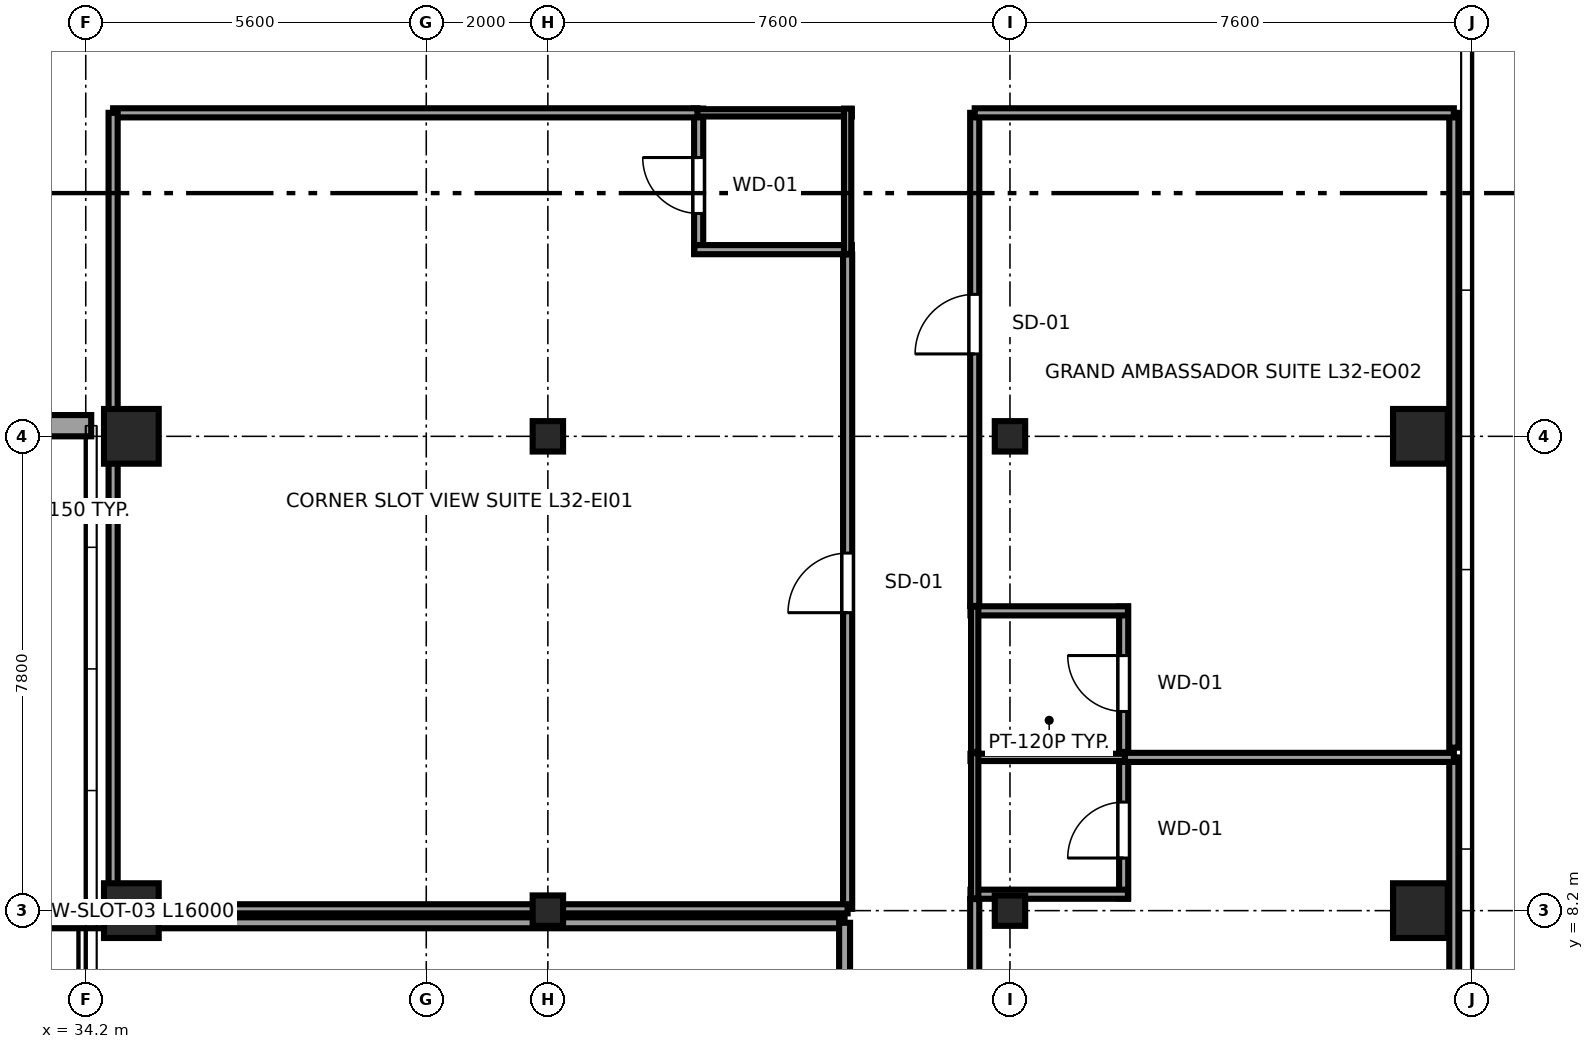
"""IFC4 building model, lengths in metres.
Left out: names, types, materials, properties, quantities, classifications, styles, units other than length and angle.
Written with IfcOpenShell. Run it as: python <this file> out.ifc"""

import sys

from ifc_helpers import new_model, si_unit, direction, frame, frame_2d, origin, origin_2d, place, context, subcontext, project, spatial, rectangle, i_section, extrude, source, transform, mapped, element, fill, save


model = new_model("IFC4")
c1 = context("Model", 3, precision=1e-05, world=origin(), true_north=direction((0.0, 1.0)))
c2 = subcontext(c1, "Body", "Model", "MODEL_VIEW")
j1 = project(units=[si_unit("LENGTHUNIT", "METRE"), si_unit("PLANEANGLEUNIT", "RADIAN")], contexts=[c1])
p1 = place(None, origin())
s1 = spatial("IfcSite", under=j1, at=p1, CompositionType="ELEMENT")
p2 = place(p1, origin())
s2 = spatial("IfcBuilding", under=s1, at=p2, CompositionType="ELEMENT")
p3 = place(p2, frame((0.0, 0.0, 125.75)))
s3 = spatial("IfcBuildingStorey", under=s2, at=p3, CompositionType="ELEMENT", Elevation=125.75)
m1 = source(origin(), c2, "Body", "SweptSolid", [
    extrude(rectangle(XDim=0.9, YDim=0.9, at=origin_2d()), origin(), (0.0, 0.0, 1.0), 3.55),
])
for number, where, z_axis, x_axis in (
    (1, (34.95, 8.2, 0.0), (0.0, 0.0, 1.0), (1.0, 0.0, 0.0)),
    (2, (34.95, 16.0, 0.0), (0.0, 0.0, 1.0), (1.0, 0.0, 0.0)),
):
    element("IfcColumn", number, at=place(p3, frame(where, z_axis=z_axis, x_axis=x_axis)), inside=s3, PredefinedType="COLUMN", context=c2, shape_type="MappedRepresentation", body=[
        mapped(m1, transform((0.0, 0.0, 0.0), x_axis=(1.0, 0.0, 0.0), y_axis=(0.0, 1.0, 0.0), z_axis=(0.0, 0.0, 1.0), scale=1.0)),
    ])
m2 = source(origin(), c2, "Body", "SweptSolid", [
    extrude(i_section(OverallWidth=0.5, OverallDepth=0.5, WebThickness=0.022, FlangeThickness=0.034, at=origin_2d()), origin(), (0.0, 0.0, 1.0), 3.55),
])
for number, where, z_axis, x_axis in (
    (3, (41.8, 8.2, 0.0), (0.0, 0.0, 1.0), (1.0, 0.0, 0.0)),
    (4, (41.8, 16.0, 0.0), (0.0, 0.0, 1.0), (1.0, 0.0, 0.0)),
    (5, (49.4, 8.2, 0.0), (0.0, 0.0, 1.0), (1.0, 0.0, 0.0)),
    (6, (49.4, 16.0, 0.0), (0.0, 0.0, 1.0), (1.0, 0.0, 0.0)),
):
    element("IfcColumn", number, at=place(p3, frame(where, z_axis=z_axis, x_axis=x_axis)), inside=s3, PredefinedType="COLUMN", context=c2, shape_type="MappedRepresentation", body=[
        mapped(m2, transform((0.0, 0.0, 0.0), x_axis=(1.0, 0.0, 0.0), y_axis=(0.0, 1.0, 0.0), z_axis=(0.0, 0.0, 1.0), scale=1.0)),
    ])
for number, where, z_axis, x_axis in (
    (7, (56.15, 8.2, 0.0), (0.0, 0.0, 1.0), (1.0, 0.0, 0.0)),
    (8, (56.15, 16.0, 0.0), (0.0, 0.0, 1.0), (1.0, 0.0, 0.0)),
):
    element("IfcColumn", number, at=place(p3, frame(where, z_axis=z_axis, x_axis=x_axis)), inside=s3, PredefinedType="COLUMN", context=c2, shape_type="MappedRepresentation", body=[
        mapped(m1, transform((0.0, 0.0, 0.0), x_axis=(1.0, 0.0, 0.0), y_axis=(0.0, 1.0, 0.0), z_axis=(0.0, 0.0, 1.0), scale=1.0)),
    ])
p4 = place(p3, frame((22.71, 16.175, 0.0), z_axis=(0.0, 0.0, 1.0), x_axis=(1.0, 0.0, 0.0)))
e9 = element("IfcWall", 9, at=p4, inside=s3, PredefinedType="SOLIDWALL", context=c2, shape_type="SweptSolid", body=[
    extrude(rectangle(XDim=11.58, YDim=0.35, at=frame_2d((5.79, 0.0))), origin(), (0.0, 0.0, 1.0), 2.748),
])
p5 = place(p4, frame((2.295, 0.0, 0.68)))
e10 = element("IfcOpeningElement", 10, at=p5, cuts=e9, PredefinedType="OPENING", context=c2, shape_type="SweptSolid", body=[
    extrude(rectangle(XDim=1.8, YDim=1.85, at=frame_2d((0.9, 0.925))), frame((0.0, 0.185, 0.0), z_axis=(0.0, -1.0, 0.0), x_axis=(1.0, 0.0, 0.0)), (0.0, 0.0, 1.0), 0.37),
])
p6 = place(p4, frame((7.485, 0.0, 0.68)))
e11 = element("IfcOpeningElement", 11, at=p6, cuts=e9, PredefinedType="OPENING", context=c2, shape_type="SweptSolid", body=[
    extrude(rectangle(XDim=1.8, YDim=1.85, at=frame_2d((0.9, 0.925))), frame((0.0, 0.185, 0.0), z_axis=(0.0, -1.0, 0.0), x_axis=(1.0, 0.0, 0.0)), (0.0, 0.0, 1.0), 0.37),
])
p7 = place(p3, frame((44.28, 19.0, 0.0), z_axis=(0.0, 0.0, 1.0), x_axis=(0.0, 1.0, 0.0)))
e12 = element("IfcWall", 12, at=p7, inside=s3, PredefinedType="PARTITIONING", context=c2, shape_type="SweptSolid", body=[
    extrude(rectangle(XDim=2.39, YDim=0.15, at=frame_2d((1.195, 0.0))), origin(), (0.0, 0.0, 1.0), 3.37),
])
p8 = place(p7, frame((0.665, 0.0, 0.0)))
e13 = element("IfcOpeningElement", 13, at=p8, cuts=e12, PredefinedType="OPENING", context=c2, shape_type="SweptSolid", body=[
    extrude(rectangle(XDim=0.92, YDim=2.01, at=frame_2d((0.46, 1.005))), frame((0.0, 0.085, 0.0), z_axis=(0.0, -1.0, 0.0), x_axis=(1.0, 0.0, 0.0)), (0.0, 0.0, 1.0), 0.17),
])
p9 = place(p3, frame((44.21, 19.07, 0.0), z_axis=(0.0, 0.0, 1.0), x_axis=(1.0, 0.0, 0.0)))
e14 = element("IfcWall", 14, at=p9, inside=s3, PredefinedType="PARTITIONING", context=c2, shape_type="SweptSolid", body=[
    extrude(rectangle(XDim=2.59, YDim=0.15, at=frame_2d((1.295, 0.0))), origin(), (0.0, 0.0, 1.0), 3.37),
])
p10 = place(p3, frame((44.21, 21.32, 0.0), z_axis=(0.0, 0.0, 1.0), x_axis=(1.0, 0.0, 0.0)))
e15 = element("IfcWall", 15, at=p10, inside=s3, PredefinedType="PLUMBINGWALL", context=c2, shape_type="SweptSolid", body=[
    extrude(rectangle(XDim=2.59, YDim=0.12, at=frame_2d((1.295, 0.0))), origin(), (0.0, 0.0, 1.0), 3.37),
])
p11 = place(p3, frame((46.73, 19.0, 0.0), z_axis=(0.0, 0.0, 1.0), x_axis=(0.0, 1.0, 0.0)))
e16 = element("IfcWall", 16, at=p11, inside=s3, PredefinedType="PLUMBINGWALL", context=c2, shape_type="SweptSolid", body=[
    extrude(rectangle(XDim=2.39, YDim=0.12, at=frame_2d((1.195, 0.0))), origin(), (0.0, 0.0, 1.0), 3.37),
])
p12 = place(p3, frame((51.27, 8.4, 0.0), z_axis=(0.0, 0.0, 1.0), x_axis=(0.0, 1.0, 0.0)))
e17 = element("IfcWall", 17, at=p12, inside=s3, PredefinedType="PARTITIONING", context=c2, shape_type="SweptSolid", body=[
    extrude(rectangle(XDim=2.39, YDim=0.15, at=frame_2d((1.195, 0.0))), origin(), (0.0, 0.0, 1.0), 3.37),
])
p13 = place(p12, frame((0.665, 0.0, 0.0)))
e18 = element("IfcOpeningElement", 18, at=p13, cuts=e17, PredefinedType="OPENING", context=c2, shape_type="SweptSolid", body=[
    extrude(rectangle(XDim=0.92, YDim=2.01, at=frame_2d((0.46, 1.005))), frame((0.0, 0.085, 0.0), z_axis=(0.0, -1.0, 0.0), x_axis=(1.0, 0.0, 0.0)), (0.0, 0.0, 1.0), 0.17),
])
p14 = place(p3, frame((48.75, 8.47, 0.0), z_axis=(0.0, 0.0, 1.0), x_axis=(1.0, 0.0, 0.0)))
e19 = element("IfcWall", 19, at=p14, inside=s3, PredefinedType="PARTITIONING", context=c2, shape_type="SweptSolid", body=[
    extrude(rectangle(XDim=2.59, YDim=0.15, at=frame_2d((1.295, 0.0))), origin(), (0.0, 0.0, 1.0), 3.37),
])
p15 = place(p3, frame((48.75, 10.72, 0.0), z_axis=(0.0, 0.0, 1.0), x_axis=(1.0, 0.0, 0.0)))
e20 = element("IfcWall", 20, at=p15, inside=s3, PredefinedType="PLUMBINGWALL", context=c2, shape_type="SweptSolid", body=[
    extrude(rectangle(XDim=2.59, YDim=0.12, at=frame_2d((1.295, 0.0))), origin(), (0.0, 0.0, 1.0), 3.37),
])
p16 = place(p3, frame((48.82, 8.4, 0.0), z_axis=(0.0, 0.0, 1.0), x_axis=(0.0, 1.0, 0.0)))
e21 = element("IfcWall", 21, at=p16, inside=s3, PredefinedType="PLUMBINGWALL", context=c2, shape_type="SweptSolid", body=[
    extrude(rectangle(XDim=2.39, YDim=0.12, at=frame_2d((1.195, 0.0))), origin(), (0.0, 0.0, 1.0), 3.37),
])
p17 = place(p3, frame((51.27, 10.81, 0.0), z_axis=(0.0, 0.0, 1.0), x_axis=(0.0, 1.0, 0.0)))
e22 = element("IfcWall", 22, at=p17, inside=s3, PredefinedType="PARTITIONING", context=c2, shape_type="SweptSolid", body=[
    extrude(rectangle(XDim=2.39, YDim=0.15, at=frame_2d((1.195, 0.0))), origin(), (0.0, 0.0, 1.0), 3.37),
])
p18 = place(p17, frame((0.665, 0.0, 0.0)))
e23 = element("IfcOpeningElement", 23, at=p18, cuts=e22, PredefinedType="OPENING", context=c2, shape_type="SweptSolid", body=[
    extrude(rectangle(XDim=0.92, YDim=2.01, at=frame_2d((0.46, 1.005))), frame((0.0, 0.085, 0.0), z_axis=(0.0, -1.0, 0.0), x_axis=(1.0, 0.0, 0.0)), (0.0, 0.0, 1.0), 0.17),
])
p19 = place(p3, frame((48.75, 13.13, 0.0), z_axis=(0.0, 0.0, 1.0), x_axis=(1.0, 0.0, 0.0)))
e24 = element("IfcWall", 24, at=p19, inside=s3, PredefinedType="PARTITIONING", context=c2, shape_type="SweptSolid", body=[
    extrude(rectangle(XDim=2.59, YDim=0.15, at=frame_2d((1.295, 0.0))), origin(), (0.0, 0.0, 1.0), 3.37),
])
p20 = place(p3, frame((48.82, 10.81, 0.0), z_axis=(0.0, 0.0, 1.0), x_axis=(0.0, 1.0, 0.0)))
e25 = element("IfcWall", 25, at=p20, inside=s3, PredefinedType="PLUMBINGWALL", context=c2, shape_type="SweptSolid", body=[
    extrude(rectangle(XDim=2.39, YDim=0.12, at=frame_2d((1.195, 0.0))), origin(), (0.0, 0.0, 1.0), 3.37),
])
p21 = place(p3, frame((46.73, 8.23, 0.0), z_axis=(0.0, 0.0, 1.0), x_axis=(0.0, 1.0, 0.0)))
e26 = element("IfcWall", 26, at=p21, inside=s3, PredefinedType="PARTITIONING", context=c2, shape_type="SweptSolid", body=[
    extrude(rectangle(XDim=10.76, YDim=0.15, at=frame_2d((5.38, 0.0))), origin(), (0.0, 0.0, 1.0), 3.37),
])
p22 = place(p21, frame((4.87, 0.0, 0.0)))
e27 = element("IfcOpeningElement", 27, at=p22, cuts=e26, PredefinedType="OPENING", context=c2, shape_type="SweptSolid", body=[
    extrude(rectangle(XDim=0.98, YDim=2.12, at=frame_2d((0.49, 1.06))), frame((0.0, 0.085, 0.0), z_axis=(0.0, -1.0, 0.0), x_axis=(1.0, 0.0, 0.0)), (0.0, 0.0, 1.0), 0.17),
])
p23 = place(p3, frame((34.65, 8.23, 0.0), z_axis=(0.0, 0.0, 1.0), x_axis=(1.0, 0.0, 0.0)))
e28 = element("IfcWall", 28, at=p23, inside=s3, PredefinedType="PARTITIONING", context=c2, shape_type="SweptSolid", body=[
    extrude(rectangle(XDim=12.08, YDim=0.15, at=frame_2d((6.04, 0.0))), origin(), (0.0, 0.0, 1.0), 2.748),
])
p24 = place(p3, frame((34.65, 21.32, 0.0), z_axis=(0.0, 0.0, 1.0), x_axis=(1.0, 0.0, 0.0)))
e29 = element("IfcWall", 29, at=p24, inside=s3, PredefinedType="PARTITIONING", context=c2, shape_type="SweptSolid", body=[
    extrude(rectangle(XDim=9.61, YDim=0.15, at=frame_2d((4.805, 0.0))), origin(), (0.0, 0.0, 1.0), 3.37),
])
p25 = place(p3, frame((34.65, 8.23, 0.0), z_axis=(0.0, 0.0, 1.0), x_axis=(0.0, 1.0, 0.0)))
e30 = element("IfcWall", 30, at=p25, inside=s3, PredefinedType="PARTITIONING", context=c2, shape_type="SweptSolid", body=[
    extrude(rectangle(XDim=13.09, YDim=0.15, at=frame_2d((6.545, 0.0))), origin(), (0.0, 0.0, 1.0), 3.37),
])
p26 = place(p3, frame((48.82, 0.405, 0.0), z_axis=(0.0, 0.0, 1.0), x_axis=(0.0, 1.0, 0.0)))
e31 = element("IfcWall", 31, at=p26, inside=s3, PredefinedType="PARTITIONING", context=c2, shape_type="SweptSolid", body=[
    extrude(rectangle(XDim=7.985, YDim=0.15, at=frame_2d((3.992, 0.0))), origin(), (0.0, 0.0, 1.0), 3.37),
])
p27 = place(p26, frame((3.51, 0.0, 0.0)))
e32 = element("IfcOpeningElement", 32, at=p27, cuts=e31, PredefinedType="OPENING", context=c2, shape_type="SweptSolid", body=[
    extrude(rectangle(XDim=0.98, YDim=2.12, at=frame_2d((0.49, 1.06))), frame((0.0, 0.085, 0.0), z_axis=(0.0, -1.0, 0.0), x_axis=(1.0, 0.0, 0.0)), (0.0, 0.0, 1.0), 0.17),
])
p28 = place(p3, frame((56.7, 4.642, 0.0), z_axis=(0.0, 0.0, 1.0), x_axis=(0.0, 1.0, 0.0)))
e33 = element("IfcWall", 33, at=p28, inside=s3, PredefinedType="PARTITIONING", context=c2, shape_type="SweptSolid", body=[
    extrude(rectangle(XDim=6.078, YDim=0.15, at=frame_2d((3.039, 0.0))), origin(), (0.0, 0.0, 1.0), 3.37),
])
p29 = place(p3, frame((51.29, 10.72, 0.0), z_axis=(0.0, 0.0, 1.0), x_axis=(1.0, 0.0, 0.0)))
e34 = element("IfcWall", 34, at=p29, inside=s3, PredefinedType="PARTITIONING", context=c2, shape_type="SweptSolid", body=[
    extrude(rectangle(XDim=5.41, YDim=0.15, at=frame_2d((2.705, 0.0))), origin(), (0.0, 0.0, 1.0), 3.37),
])
p30 = place(p3, frame((48.82, 13.21, 0.0), z_axis=(0.0, 0.0, 1.0), x_axis=(0.0, 1.0, 0.0)))
e35 = element("IfcWall", 35, at=p30, inside=s3, PredefinedType="PARTITIONING", context=c2, shape_type="SweptSolid", body=[
    extrude(rectangle(XDim=8.11, YDim=0.15, at=frame_2d((4.055, 0.0))), origin(), (0.0, 0.0, 1.0), 3.37),
])
p31 = place(p30, frame((4.145, 0.0, 0.0)))
e36 = element("IfcOpeningElement", 36, at=p31, cuts=e35, PredefinedType="OPENING", context=c2, shape_type="SweptSolid", body=[
    extrude(rectangle(XDim=0.98, YDim=2.12, at=frame_2d((0.49, 1.06))), frame((0.0, 0.085, 0.0), z_axis=(0.0, -1.0, 0.0), x_axis=(1.0, 0.0, 0.0)), (0.0, 0.0, 1.0), 0.17),
])
p32 = place(p3, frame((56.7, 10.88, 0.0), z_axis=(0.0, 0.0, 1.0), x_axis=(0.0, 1.0, 0.0)))
e37 = element("IfcWall", 37, at=p32, inside=s3, PredefinedType="PARTITIONING", context=c2, shape_type="SweptSolid", body=[
    extrude(rectangle(XDim=10.44, YDim=0.15, at=frame_2d((5.22, 0.0))), origin(), (0.0, 0.0, 1.0), 3.37),
])
p33 = place(p3, frame((48.82, 21.32, 0.0), z_axis=(0.0, 0.0, 1.0), x_axis=(1.0, 0.0, 0.0)))
e38 = element("IfcWall", 38, at=p33, inside=s3, PredefinedType="PARTITIONING", context=c2, shape_type="SweptSolid", body=[
    extrude(rectangle(XDim=7.88, YDim=0.15, at=frame_2d((3.94, 0.0))), origin(), (0.0, 0.0, 1.0), 3.37),
])
p34 = place(p3, frame((11.57, 8.0, 0.0), z_axis=(0.0, 0.0, 1.0), x_axis=(1.0, 0.0, 0.0)))
e39 = element("IfcWall", 39, at=p34, inside=s3, PredefinedType="PARTITIONING", context=c2, shape_type="SweptSolid", body=[
    extrude(rectangle(XDim=35.11, YDim=0.18, at=frame_2d((17.555, 0.0))), origin(), (0.0, 0.0, 1.0), 3.37),
])
p35 = place(p3, frame((46.68, 2.6, 0.0), z_axis=(0.0, 0.0, 1.0), x_axis=(0.0, 1.0, 0.0)))
e40 = element("IfcWall", 40, at=p35, inside=s3, PredefinedType="PARTITIONING", context=c2, shape_type="SweptSolid", body=[
    extrude(rectangle(XDim=5.4, YDim=0.18, at=frame_2d((2.7, 0.0))), origin(), (0.0, 0.0, 1.0), 3.37),
])
m3 = source(origin(), c2, "Body", "SweptSolid", [
    extrude(rectangle(XDim=0.92, YDim=2.01, at=frame_2d((0.46, 1.005))), frame((0.0, 0.025, 0.0), z_axis=(0.0, -1.0, 0.0), x_axis=(1.0, 0.0, 0.0)), (0.0, 0.0, 1.0), 0.05),
])
p36 = place(p8, origin())
e41 = element("IfcDoor", 41, at=p36, inside=s3, OperationType="SINGLE_SWING_RIGHT", PredefinedType="DOOR", context=c2, shape_type="MappedRepresentation", body=[
    mapped(m3, transform((0.0, 0.0, 0.0), x_axis=(1.0, 0.0, 0.0), y_axis=(0.0, 1.0, 0.0), z_axis=(0.0, 0.0, 1.0), scale=1.0)),
])
fill(e13, e41)
p37 = place(p13, origin())
e42 = element("IfcDoor", 42, at=p37, inside=s3, OperationType="SINGLE_SWING_LEFT", PredefinedType="DOOR", context=c2, shape_type="MappedRepresentation", body=[
    mapped(m3, transform((0.0, 0.0, 0.0), x_axis=(1.0, 0.0, 0.0), y_axis=(0.0, 1.0, 0.0), z_axis=(0.0, 0.0, 1.0), scale=1.0)),
])
fill(e18, e42)
p38 = place(p18, origin())
e43 = element("IfcDoor", 43, at=p38, inside=s3, OperationType="SINGLE_SWING_RIGHT", PredefinedType="DOOR", context=c2, shape_type="MappedRepresentation", body=[
    mapped(m3, transform((0.0, 0.0, 0.0), x_axis=(1.0, 0.0, 0.0), y_axis=(0.0, 1.0, 0.0), z_axis=(0.0, 0.0, 1.0), scale=1.0)),
])
fill(e23, e43)
m4 = source(origin(), c2, "Body", "SweptSolid", [
    extrude(rectangle(XDim=0.98, YDim=2.12, at=frame_2d((0.49, 1.06))), frame((0.0, 0.025, 0.0), z_axis=(0.0, -1.0, 0.0), x_axis=(1.0, 0.0, 0.0)), (0.0, 0.0, 1.0), 0.05),
])
p39 = place(p22, origin())
e44 = element("IfcDoor", 44, at=p39, inside=s3, OperationType="SINGLE_SWING_LEFT", PredefinedType="DOOR", context=c2, shape_type="MappedRepresentation", body=[
    mapped(m4, transform((0.0, 0.0, 0.0), x_axis=(1.0, 0.0, 0.0), y_axis=(0.0, 1.0, 0.0), z_axis=(0.0, 0.0, 1.0), scale=1.0)),
])
fill(e27, e44)
p40 = place(p31, origin())
e45 = element("IfcDoor", 45, at=p40, inside=s3, OperationType="SINGLE_SWING_LEFT", PredefinedType="DOOR", context=c2, shape_type="MappedRepresentation", body=[
    mapped(m4, transform((0.0, 0.0, 0.0), x_axis=(1.0, 0.0, 0.0), y_axis=(0.0, 1.0, 0.0), z_axis=(0.0, 0.0, 1.0), scale=1.0)),
])
fill(e36, e45)
save(model, sys.argv[1])
